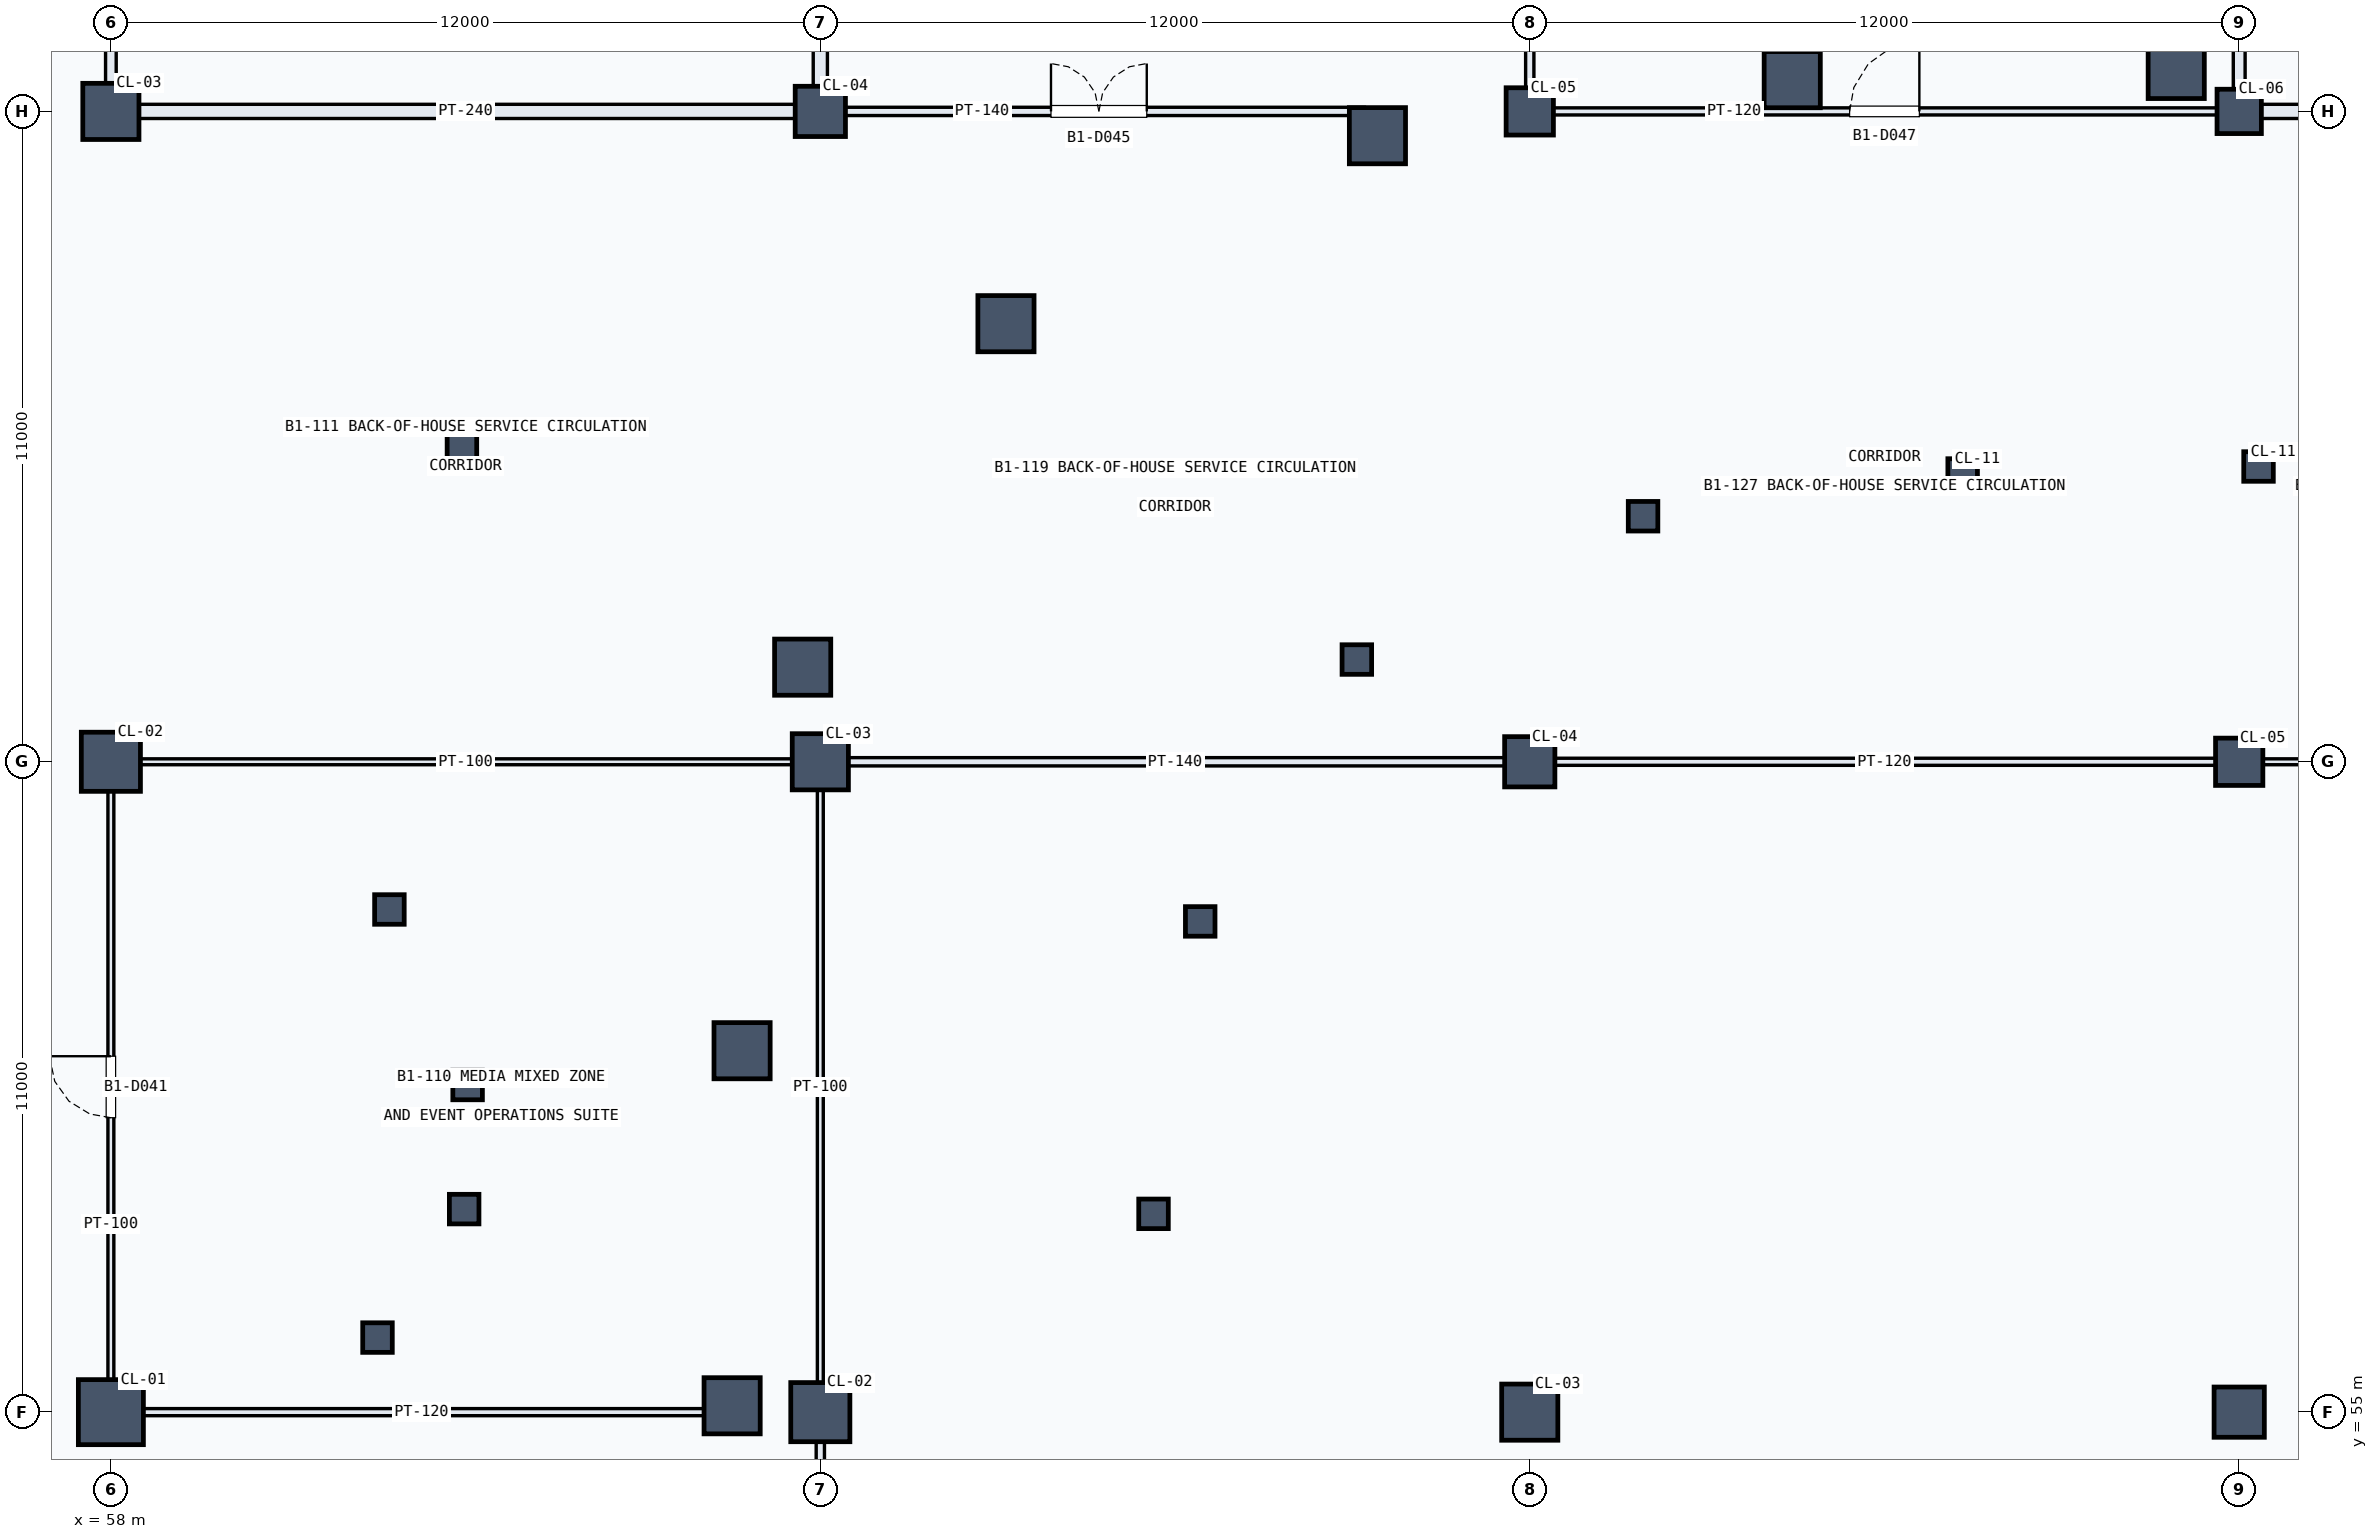
"""IFC4 building model, lengths in metres.
Left out: names, types, materials, properties, quantities, classifications, styles, units other than length and angle.
Written with IfcOpenShell. Run it as: python <this file> out.ifc"""

import sys

from ifc_helpers import new_model, si_unit, direction, frame, frame_2d, origin, origin_2d, place, context, subcontext, project, spatial, rectangle, extrude, element, fill, save


model = new_model("IFC4")
c1 = context("Model", 3, precision=1e-05, world=origin(), true_north=direction((0.0, 1.0)))
c2 = subcontext(c1, "Body", "Model", "MODEL_VIEW")
j1 = project(units=[si_unit("LENGTHUNIT", "METRE"), si_unit("PLANEANGLEUNIT", "RADIAN")], contexts=[c1])
p1 = place(None, origin())
s1 = spatial("IfcSite", under=j1, at=p1, CompositionType="ELEMENT")
p2 = place(p1, origin())
s2 = spatial("IfcBuilding", under=s1, at=p2, CompositionType="ELEMENT")
p3 = place(p2, frame((0.0, 0.0, -5.4)))
s3 = spatial("IfcBuildingStorey", under=s2, at=p3, CompositionType="ELEMENT", Elevation=-5.4)
p4 = place(p3, frame((58.0, 55.0, 0.0), z_axis=(0.0, 0.0, 1.0), x_axis=(1.0, 0.0, 0.0)))
e1 = element("IfcColumn", 1, at=p4, inside=s3, PredefinedType="COLUMN", context=c2, shape_type="SweptSolid", body=[
    extrude(rectangle(XDim=1.1, YDim=1.1, at=origin_2d()), origin(), (0.0, 0.0, 1.0), 5.4),
])
p5 = place(p3, frame((58.0, 66.0, 0.0), z_axis=(0.0, 0.0, 1.0), x_axis=(1.0, 0.0, 0.0)))
e2 = element("IfcColumn", 2, at=p5, inside=s3, PredefinedType="COLUMN", context=c2, shape_type="SweptSolid", body=[
    extrude(rectangle(XDim=1.0, YDim=1.0, at=origin_2d()), origin(), (0.0, 0.0, 1.0), 5.4),
])
p6 = place(p3, frame((58.0, 77.0, 0.0), z_axis=(0.0, 0.0, 1.0), x_axis=(1.0, 0.0, 0.0)))
e3 = element("IfcColumn", 3, at=p6, inside=s3, PredefinedType="COLUMN", context=c2, shape_type="SweptSolid", body=[
    extrude(rectangle(XDim=0.95, YDim=0.95, at=origin_2d()), origin(), (0.0, 0.0, 1.0), 5.4),
])
p7 = place(p3, frame((70.0, 55.0, 0.0), z_axis=(0.0, 0.0, 1.0), x_axis=(1.0, 0.0, 0.0)))
e4 = element("IfcColumn", 4, at=p7, inside=s3, PredefinedType="COLUMN", context=c2, shape_type="SweptSolid", body=[
    extrude(rectangle(XDim=1.0, YDim=1.0, at=origin_2d()), origin(), (0.0, 0.0, 1.0), 5.4),
])
p8 = place(p3, frame((70.0, 66.0, 0.0), z_axis=(0.0, 0.0, 1.0), x_axis=(1.0, 0.0, 0.0)))
e5 = element("IfcColumn", 5, at=p8, inside=s3, PredefinedType="COLUMN", context=c2, shape_type="SweptSolid", body=[
    extrude(rectangle(XDim=0.95, YDim=0.95, at=origin_2d()), origin(), (0.0, 0.0, 1.0), 5.4),
])
p9 = place(p3, frame((70.0, 77.0, 0.0), z_axis=(0.0, 0.0, 1.0), x_axis=(1.0, 0.0, 0.0)))
e6 = element("IfcColumn", 6, at=p9, inside=s3, PredefinedType="COLUMN", context=c2, shape_type="SweptSolid", body=[
    extrude(rectangle(XDim=0.85, YDim=0.85, at=origin_2d()), origin(), (0.0, 0.0, 1.0), 5.4),
])
p10 = place(p3, frame((82.0, 55.0, 0.0), z_axis=(0.0, 0.0, 1.0), x_axis=(1.0, 0.0, 0.0)))
e7 = element("IfcColumn", 7, at=p10, inside=s3, PredefinedType="COLUMN", context=c2, shape_type="SweptSolid", body=[
    extrude(rectangle(XDim=0.95, YDim=0.95, at=origin_2d()), origin(), (0.0, 0.0, 1.0), 5.4),
])
p11 = place(p3, frame((82.0, 66.0, 0.0), z_axis=(0.0, 0.0, 1.0), x_axis=(1.0, 0.0, 0.0)))
e8 = element("IfcColumn", 8, at=p11, inside=s3, PredefinedType="COLUMN", context=c2, shape_type="SweptSolid", body=[
    extrude(rectangle(XDim=0.85, YDim=0.85, at=origin_2d()), origin(), (0.0, 0.0, 1.0), 5.4),
])
p12 = place(p3, frame((82.0, 77.0, 0.0), z_axis=(0.0, 0.0, 1.0), x_axis=(1.0, 0.0, 0.0)))
e9 = element("IfcColumn", 9, at=p12, inside=s3, PredefinedType="COLUMN", context=c2, shape_type="SweptSolid", body=[
    extrude(rectangle(XDim=0.8, YDim=0.8, at=origin_2d()), origin(), (0.0, 0.0, 1.0), 5.4),
])
p13 = place(p3, frame((94.0, 55.0, 0.0), z_axis=(0.0, 0.0, 1.0), x_axis=(1.0, 0.0, 0.0)))
e10 = element("IfcColumn", 10, at=p13, inside=s3, PredefinedType="COLUMN", context=c2, shape_type="SweptSolid", body=[
    extrude(rectangle(XDim=0.85, YDim=0.85, at=origin_2d()), origin(), (0.0, 0.0, 1.0), 5.4),
])
p14 = place(p3, frame((94.0, 66.0, 0.0), z_axis=(0.0, 0.0, 1.0), x_axis=(1.0, 0.0, 0.0)))
e11 = element("IfcColumn", 11, at=p14, inside=s3, PredefinedType="COLUMN", context=c2, shape_type="SweptSolid", body=[
    extrude(rectangle(XDim=0.8, YDim=0.8, at=origin_2d()), origin(), (0.0, 0.0, 1.0), 5.4),
])
p15 = place(p3, frame((94.0, 77.0, 0.0), z_axis=(0.0, 0.0, 1.0), x_axis=(1.0, 0.0, 0.0)))
e12 = element("IfcColumn", 12, at=p15, inside=s3, PredefinedType="COLUMN", context=c2, shape_type="SweptSolid", body=[
    extrude(rectangle(XDim=0.75, YDim=0.75, at=origin_2d()), origin(), (0.0, 0.0, 1.0), 5.4),
])
for number, where, z_axis, x_axis in (
    (13, (94.327, 70.994, 0.0), (0.0, 0.0, 1.0), (1.0, 0.0, 0.0)),
    (14, (89.322, 70.875, 0.0), (0.0, 0.0, 1.0), (1.0, 0.0, 0.0)),
    (15, (83.917, 70.153, 0.0), (0.0, 0.0, 1.0), (1.0, 0.0, 0.0)),
    (16, (79.075, 67.729, 0.0), (0.0, 0.0, 1.0), (1.0, 0.0, 0.0)),
    (17, (76.426, 63.3, 0.0), (0.0, 0.0, 1.0), (1.0, 0.0, 0.0)),
    (18, (75.636, 58.354, 0.0), (0.0, 0.0, 1.0), (1.0, 0.0, 0.0)),
    (19, (63.938, 71.323, 0.0), (0.0, 0.0, 1.0), (1.0, 0.0, 0.0)),
    (20, (62.711, 63.502, 0.0), (0.0, 0.0, 1.0), (1.0, 0.0, 0.0)),
    (21, (62.51, 56.261, 0.0), (0.0, 0.0, 1.0), (1.0, 0.0, 0.0)),
):
    element("IfcColumn", number, at=place(p3, frame(where, z_axis=z_axis, x_axis=x_axis)), inside=s3, PredefinedType="COLUMN", context=c2, shape_type="SweptSolid", body=[
        extrude(rectangle(XDim=0.5, YDim=0.5, at=origin_2d()), origin(), (0.0, 0.0, 1.0), 5.4),
    ])
for number, where, z_axis, x_axis in (
    (22, (92.935, 77.692, 0.0), (0.0, 0.0, 1.0), (1.0, 0.0, 0.0)),
    (23, (86.44, 77.537, 0.0), (0.0, 0.0, 1.0), (1.0, 0.0, 0.0)),
    (24, (79.423, 76.589, 0.0), (0.0, 0.0, 1.0), (1.0, 0.0, 0.0)),
    (25, (73.14, 73.41, 0.0), (0.0, 0.0, 1.0), (1.0, 0.0, 0.0)),
    (26, (69.701, 67.6, 0.0), (0.0, 0.0, 1.0), (1.0, 0.0, 0.0)),
    (27, (68.677, 61.113, 0.0), (0.0, 0.0, 1.0), (1.0, 0.0, 0.0)),
    (28, (68.508, 55.108, 0.0), (0.0, 0.0, 1.0), (1.0, 0.0, 0.0)),
):
    element("IfcColumn", number, at=place(p3, frame(where, z_axis=z_axis, x_axis=x_axis)), inside=s3, PredefinedType="COLUMN", context=c2, shape_type="SweptSolid", body=[
        extrude(rectangle(XDim=0.95, YDim=0.95, at=origin_2d()), origin(), (0.0, 0.0, 1.0), 5.4),
    ])
for number, where, z_axis, x_axis in (
    (29, (64.034, 60.533, 0.0), (0.0, 0.0, 1.0), (1.0, 0.0, 0.0)),
    (30, (63.976, 58.434, 0.0), (0.0, 0.0, 1.0), (1.0, 0.0, 0.0)),
):
    element("IfcColumn", number, at=place(p3, frame(where, z_axis=z_axis, x_axis=x_axis)), inside=s3, PredefinedType="COLUMN", context=c2, shape_type="SweptSolid", body=[
        extrude(rectangle(XDim=0.5, YDim=0.5, at=origin_2d()), origin(), (0.0, 0.0, 1.0), 5.4),
    ])
p16 = place(p3, frame((70.0, 44.22, 0.0), z_axis=(0.0, 0.0, 1.0), x_axis=(0.0, 1.0, 0.0)))
e31 = element("IfcWall", 31, at=p16, inside=s3, PredefinedType="PARTITIONING", context=c2, shape_type="SweptSolid", body=[
    extrude(rectangle(XDim=10.56, YDim=0.14, at=frame_2d((5.28, 0.0))), origin(), (0.0, 0.0, 1.0), 4.08),
])
p17 = place(p16, frame((3.533, 0.0, 0.0)))
e32 = element("IfcOpeningElement", 32, at=p17, cuts=e31, PredefinedType="OPENING", context=c2, shape_type="SweptSolid", body=[
    extrude(rectangle(XDim=0.96, YDim=2.15, at=frame_2d((0.48, 1.075))), frame((0.0, 0.08, 0.0), z_axis=(0.0, -1.0, 0.0), x_axis=(1.0, 0.0, 0.0)), (0.0, 0.0, 1.0), 0.16),
])
p18 = place(p3, frame((70.22, 66.0, 0.0), z_axis=(0.0, 0.0, 1.0), x_axis=(1.0, 0.0, 0.0)))
e33 = element("IfcWall", 33, at=p18, inside=s3, PredefinedType="PARTITIONING", context=c2, shape_type="SweptSolid", body=[
    extrude(rectangle(XDim=11.56, YDim=0.14, at=frame_2d((5.78, 0.0))), origin(), (0.0, 0.0, 1.0), 4.13),
])
p19 = place(p3, frame((82.22, 66.0, 0.0), z_axis=(0.0, 0.0, 1.0), x_axis=(1.0, 0.0, 0.0)))
e34 = element("IfcWall", 34, at=p19, inside=s3, PredefinedType="PARTITIONING", context=c2, shape_type="SweptSolid", body=[
    extrude(rectangle(XDim=11.56, YDim=0.12, at=frame_2d((5.78, 0.0))), origin(), (0.0, 0.0, 1.0), 4.28),
])
p20 = place(p3, frame((94.22, 66.0, 0.0), z_axis=(0.0, 0.0, 1.0), x_axis=(1.0, 0.0, 0.0)))
e35 = element("IfcWall", 35, at=p20, inside=s3, PredefinedType="PARTITIONING", context=c2, shape_type="SweptSolid", body=[
    extrude(rectangle(XDim=9.56, YDim=0.1, at=frame_2d((4.78, 0.0))), origin(), (0.0, 0.0, 1.0), 4.346),
])
p21 = place(p3, frame((58.0, 55.22, 0.0), z_axis=(0.0, 0.0, 1.0), x_axis=(0.0, 1.0, 0.0)))
e36 = element("IfcWall", 36, at=p21, inside=s3, PredefinedType="PARTITIONING", context=c2, shape_type="SweptSolid", body=[
    extrude(rectangle(XDim=10.56, YDim=0.1, at=frame_2d((5.28, 0.0))), origin(), (0.0, 0.0, 1.0), 4.23),
])
p22 = place(p21, frame((4.76, 0.0, 0.0)))
e37 = element("IfcOpeningElement", 37, at=p22, cuts=e36, PredefinedType="OPENING", context=c2, shape_type="SweptSolid", body=[
    extrude(rectangle(XDim=1.04, YDim=2.15, at=frame_2d((0.52, 1.075))), frame((0.0, 0.06, 0.0), z_axis=(0.0, -1.0, 0.0), x_axis=(1.0, 0.0, 0.0)), (0.0, 0.0, 1.0), 0.12),
])
p23 = place(p3, frame((58.0, 77.22, 0.0), z_axis=(0.0, 0.0, 1.0), x_axis=(0.0, 1.0, 0.0)))
e38 = element("IfcWall", 38, at=p23, inside=s3, PredefinedType="PARTITIONING", context=c2, shape_type="SweptSolid", body=[
    extrude(rectangle(XDim=10.56, YDim=0.18, at=frame_2d((5.28, 0.0))), origin(), (0.0, 0.0, 1.0), 4.346),
])
p24 = place(p23, frame((4.78, 0.0, 0.0)))
e39 = element("IfcOpeningElement", 39, at=p24, cuts=e38, PredefinedType="OPENING", context=c2, shape_type="SweptSolid", body=[
    extrude(rectangle(XDim=1.0, YDim=2.15, at=frame_2d((0.5, 1.075))), frame((0.0, 0.1, 0.0), z_axis=(0.0, -1.0, 0.0), x_axis=(1.0, 0.0, 0.0)), (0.0, 0.0, 1.0), 0.2),
])
p25 = place(p3, frame((58.22, 55.0, 0.0), z_axis=(0.0, 0.0, 1.0), x_axis=(1.0, 0.0, 0.0)))
e40 = element("IfcWall", 40, at=p25, inside=s3, PredefinedType="PARTITIONING", context=c2, shape_type="SweptSolid", body=[
    extrude(rectangle(XDim=10.068, YDim=0.12, at=frame_2d((5.034, 0.0))), origin(), (0.0, 0.0, 1.0), 4.23),
])
p26 = place(p3, frame((58.22, 66.0, 0.0), z_axis=(0.0, 0.0, 1.0), x_axis=(1.0, 0.0, 0.0)))
e41 = element("IfcWall", 41, at=p26, inside=s3, PredefinedType="PARTITIONING", context=c2, shape_type="SweptSolid", body=[
    extrude(rectangle(XDim=11.56, YDim=0.1, at=frame_2d((5.78, 0.0))), origin(), (0.0, 0.0, 1.0), 4.13),
])
p27 = place(p3, frame((58.22, 77.0, 0.0), z_axis=(0.0, 0.0, 1.0), x_axis=(1.0, 0.0, 0.0)))
e42 = element("IfcWall", 42, at=p27, inside=s3, PredefinedType="PARTITIONING", context=c2, shape_type="SweptSolid", body=[
    extrude(rectangle(XDim=11.56, YDim=0.24, at=frame_2d((5.78, 0.0))), origin(), (0.0, 0.0, 1.0), 4.08),
])
p28 = place(p3, frame((70.22, 77.0, 0.0), z_axis=(0.0, 0.0, 1.0), x_axis=(1.0, 0.0, 0.0)))
e43 = element("IfcWall", 43, at=p28, inside=s3, PredefinedType="PARTITIONING", context=c2, shape_type="SweptSolid", body=[
    extrude(rectangle(XDim=8.983, YDim=0.14, at=frame_2d((4.492, 0.0))), origin(), (0.0, 0.0, 1.0), 4.08),
])
p29 = place(p28, frame((3.682, 0.0, 0.0)))
e44 = element("IfcOpeningElement", 44, at=p29, cuts=e43, PredefinedType="OPENING", context=c2, shape_type="SweptSolid", body=[
    extrude(rectangle(XDim=1.62, YDim=2.25, at=frame_2d((0.81, 1.125))), frame((0.0, 0.08, 0.0), z_axis=(0.0, -1.0, 0.0), x_axis=(1.0, 0.0, 0.0)), (0.0, 0.0, 1.0), 0.16),
])
p30 = place(p3, frame((82.22, 77.0, 0.0), z_axis=(0.0, 0.0, 1.0), x_axis=(1.0, 0.0, 0.0)))
e45 = element("IfcWall", 45, at=p30, inside=s3, PredefinedType="PARTITIONING", context=c2, shape_type="SweptSolid", body=[
    extrude(rectangle(XDim=11.56, YDim=0.12, at=frame_2d((5.78, 0.0))), origin(), (0.0, 0.0, 1.0), 4.28),
])
p31 = place(p30, frame((5.19, 0.0, 0.0)))
e46 = element("IfcOpeningElement", 46, at=p31, cuts=e45, PredefinedType="OPENING", context=c2, shape_type="SweptSolid", body=[
    extrude(rectangle(XDim=1.18, YDim=2.15, at=frame_2d((0.59, 1.075))), frame((0.0, 0.07, 0.0), z_axis=(0.0, -1.0, 0.0), x_axis=(1.0, 0.0, 0.0)), (0.0, 0.0, 1.0), 0.14),
])
p32 = place(p3, frame((94.22, 77.0, 0.0), z_axis=(0.0, 0.0, 1.0), x_axis=(1.0, 0.0, 0.0)))
e47 = element("IfcWall", 47, at=p32, inside=s3, PredefinedType="PARTITIONING", context=c2, shape_type="SweptSolid", body=[
    extrude(rectangle(XDim=9.56, YDim=0.24, at=frame_2d((4.78, 0.0))), origin(), (0.0, 0.0, 1.0), 4.346),
])
p33 = place(p32, frame((2.137, 0.0, 0.0)))
e48 = element("IfcOpeningElement", 48, at=p33, cuts=e47, PredefinedType="OPENING", context=c2, shape_type="SweptSolid", body=[
    extrude(rectangle(XDim=1.08, YDim=2.15, at=frame_2d((0.54, 1.075))), frame((0.0, 0.13, 0.0), z_axis=(0.0, -1.0, 0.0), x_axis=(1.0, 0.0, 0.0)), (0.0, 0.0, 1.0), 0.26),
])
p34 = place(p3, frame((70.0, 55.22, 0.0), z_axis=(0.0, 0.0, 1.0), x_axis=(0.0, 1.0, 0.0)))
e49 = element("IfcWall", 49, at=p34, inside=s3, PredefinedType="PARTITIONING", context=c2, shape_type="SweptSolid", body=[
    extrude(rectangle(XDim=10.56, YDim=0.1, at=frame_2d((5.28, 0.0))), origin(), (0.0, 0.0, 1.0), 4.13),
])
p35 = place(p3, frame((70.0, 77.22, 0.0), z_axis=(0.0, 0.0, 1.0), x_axis=(0.0, 1.0, 0.0)))
e50 = element("IfcWall", 50, at=p35, inside=s3, PredefinedType="PARTITIONING", context=c2, shape_type="SweptSolid", body=[
    extrude(rectangle(XDim=10.56, YDim=0.24, at=frame_2d((5.28, 0.0))), origin(), (0.0, 0.0, 1.0), 4.08),
])
p36 = place(p3, frame((82.0, 77.22, 0.0), z_axis=(0.0, 0.0, 1.0), x_axis=(0.0, 1.0, 0.0)))
e51 = element("IfcWall", 51, at=p36, inside=s3, PredefinedType="PARTITIONING", context=c2, shape_type="SweptSolid", body=[
    extrude(rectangle(XDim=10.56, YDim=0.14, at=frame_2d((5.28, 0.0))), origin(), (0.0, 0.0, 1.0), 4.28),
])
p37 = place(p3, frame((94.0, 77.22, 0.0), z_axis=(0.0, 0.0, 1.0), x_axis=(0.0, 1.0, 0.0)))
e52 = element("IfcWall", 52, at=p37, inside=s3, PredefinedType="PARTITIONING", context=c2, shape_type="SweptSolid", body=[
    extrude(rectangle(XDim=10.56, YDim=0.2, at=frame_2d((5.28, 0.0))), origin(), (0.0, 0.0, 1.0), 4.13),
])
p38 = place(p22, origin())
e53 = element("IfcDoor", 53, at=p38, inside=s3, OperationType="SINGLE_SWING_RIGHT", PredefinedType="DOOR", context=c2, shape_type="SweptSolid", body=[
    extrude(rectangle(XDim=1.04, YDim=2.15, at=frame_2d((0.52, 1.075))), frame((0.0, 0.025, 0.0), z_axis=(0.0, -1.0, 0.0), x_axis=(1.0, 0.0, 0.0)), (0.0, 0.0, 1.0), 0.05),
])
fill(e37, e53)
p39 = place(p29, origin())
e54 = element("IfcDoor", 54, at=p39, inside=s3, OperationType="DOUBLE_DOOR_SINGLE_SWING", PredefinedType="DOOR", context=c2, shape_type="SweptSolid", body=[
    extrude(rectangle(XDim=1.62, YDim=2.25, at=frame_2d((0.81, 1.125))), frame((0.0, 0.025, 0.0), z_axis=(0.0, -1.0, 0.0), x_axis=(1.0, 0.0, 0.0)), (0.0, 0.0, 1.0), 0.05),
])
fill(e44, e54)
p40 = place(p31, origin())
e55 = element("IfcDoor", 55, at=p40, inside=s3, OperationType="SINGLE_SWING_RIGHT", PredefinedType="DOOR", context=c2, shape_type="SweptSolid", body=[
    extrude(rectangle(XDim=1.18, YDim=2.15, at=frame_2d((0.59, 1.075))), frame((0.0, 0.025, 0.0), z_axis=(0.0, -1.0, 0.0), x_axis=(1.0, 0.0, 0.0)), (0.0, 0.0, 1.0), 0.05),
])
fill(e46, e55)
save(model, sys.argv[1])
